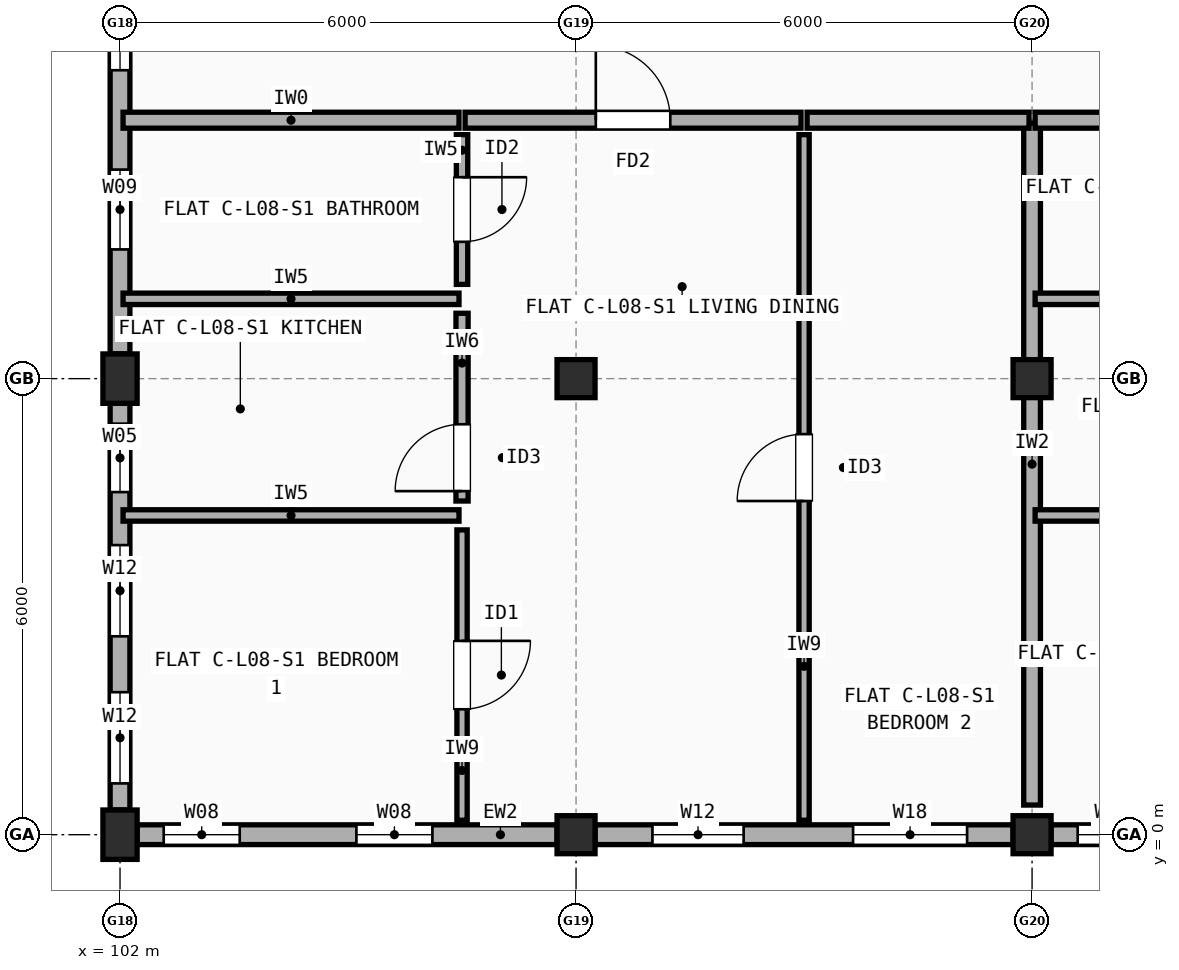
"""IFC4 building model, lengths in metres.
Left out: names, types, materials, properties, quantities, classifications, styles, units other than length and angle.
Written with IfcOpenShell. Run it as: python <this file> out.ifc"""

import sys

from ifc_helpers import new_model, si_unit, direction, frame, frame_2d, origin, origin_2d, place, context, subcontext, project, spatial, rectangle, extrude, element, fill, save


model = new_model("IFC4")
c1 = context("Model", 3, precision=1e-05, world=origin(), true_north=direction((0.0, 1.0)))
c2 = subcontext(c1, "Body", "Model", "MODEL_VIEW")
j1 = project(units=[si_unit("LENGTHUNIT", "METRE"), si_unit("PLANEANGLEUNIT", "RADIAN")], contexts=[c1])
p1 = place(None, origin())
s1 = spatial("IfcSite", under=j1, at=p1, CompositionType="ELEMENT")
p2 = place(p1, origin())
s2 = spatial("IfcBuilding", under=s1, at=p2, CompositionType="ELEMENT")
p3 = place(p2, frame((0.0, 0.0, 26.9)))
s3 = spatial("IfcBuildingStorey", under=s2, at=p3, CompositionType="ELEMENT", Elevation=26.9)
for number, where, z_axis, x_axis in (
    (1, (102.0, 0.0, 0.0), (0.0, 0.0, 1.0), (1.0, 0.0, 0.0)),
    (2, (102.0, 6.0, 0.0), (0.0, 0.0, 1.0), (1.0, 0.0, 0.0)),
):
    element("IfcColumn", number, at=place(p3, frame(where, z_axis=z_axis, x_axis=x_axis)), inside=s3, PredefinedType="COLUMN", context=c2, shape_type="SweptSolid", body=[
        extrude(rectangle(XDim=0.45, YDim=0.65, at=origin_2d()), origin(), (0.0, 0.0, 1.0), 2.98),
    ])
for number, where, z_axis, x_axis in (
    (3, (108.0, 0.0, 0.0), (0.0, 0.0, 1.0), (1.0, 0.0, 0.0)),
    (4, (108.0, 6.0, 0.0), (0.0, 0.0, 1.0), (1.0, 0.0, 0.0)),
    (5, (114.0, 0.0, 0.0), (0.0, 0.0, 1.0), (1.0, 0.0, 0.0)),
    (6, (114.0, 6.0, 0.0), (0.0, 0.0, 1.0), (1.0, 0.0, 0.0)),
):
    element("IfcColumn", number, at=place(p3, frame(where, z_axis=z_axis, x_axis=x_axis)), inside=s3, PredefinedType="COLUMN", context=c2, shape_type="SweptSolid", body=[
        extrude(rectangle(XDim=0.5, YDim=0.5, at=origin_2d()), origin(), (0.0, 0.0, 1.0), 2.98),
    ])
p4 = place(p3, frame((102.225, 0.0, 0.0), z_axis=(0.0, 0.0, 1.0), x_axis=(1.0, 0.0, 0.0)))
e7 = element("IfcWall", 7, at=p4, inside=s3, PredefinedType="STANDARD", context=c2, shape_type="SweptSolid", body=[
    extrude(rectangle(XDim=5.525, YDim=0.26, at=frame_2d((2.762, 0.0))), origin(), (0.0, 0.0, 1.0), 2.462),
])
p5 = place(p4, frame((0.35, 0.0, 0.9)))
e8 = element("IfcOpeningElement", 8, at=p5, cuts=e7, PredefinedType="OPENING", context=c2, shape_type="SweptSolid", body=[
    extrude(rectangle(XDim=1.0, YDim=1.4, at=frame_2d((0.5, 0.7))), frame((0.0, 0.14, 0.0), z_axis=(0.0, -1.0, 0.0), x_axis=(1.0, 0.0, 0.0)), (0.0, 0.0, 1.0), 0.28),
])
p6 = place(p4, frame((2.885, 0.0, 0.9)))
e9 = element("IfcOpeningElement", 9, at=p6, cuts=e7, PredefinedType="OPENING", context=c2, shape_type="SweptSolid", body=[
    extrude(rectangle(XDim=1.0, YDim=1.4, at=frame_2d((0.5, 0.7))), frame((0.0, 0.14, 0.0), z_axis=(0.0, -1.0, 0.0), x_axis=(1.0, 0.0, 0.0)), (0.0, 0.0, 1.0), 0.28),
])
p7 = place(p3, frame((108.25, 0.0, 0.0), z_axis=(0.0, 0.0, 1.0), x_axis=(1.0, 0.0, 0.0)))
e10 = element("IfcWall", 10, at=p7, inside=s3, PredefinedType="STANDARD", context=c2, shape_type="SweptSolid", body=[
    extrude(rectangle(XDim=5.5, YDim=0.26, at=frame_2d((2.75, 0.0))), origin(), (0.0, 0.0, 1.0), 2.462),
])
p8 = place(p7, frame((0.755, 0.0, 0.9)))
e11 = element("IfcOpeningElement", 11, at=p8, cuts=e10, PredefinedType="OPENING", context=c2, shape_type="SweptSolid", body=[
    extrude(rectangle(XDim=1.2, YDim=1.35, at=frame_2d((0.6, 0.675))), frame((0.0, 0.14, 0.0), z_axis=(0.0, -1.0, 0.0), x_axis=(1.0, 0.0, 0.0)), (0.0, 0.0, 1.0), 0.28),
])
p9 = place(p7, frame((3.395, 0.0, 0.9)))
e12 = element("IfcOpeningElement", 12, at=p9, cuts=e10, PredefinedType="OPENING", context=c2, shape_type="SweptSolid", body=[
    extrude(rectangle(XDim=1.5, YDim=1.4, at=frame_2d((0.75, 0.7))), frame((0.0, 0.14, 0.0), z_axis=(0.0, -1.0, 0.0), x_axis=(1.0, 0.0, 0.0)), (0.0, 0.0, 1.0), 0.28),
])
p10 = place(p3, frame((114.25, 0.0, 0.0), z_axis=(0.0, 0.0, 1.0), x_axis=(1.0, 0.0, 0.0)))
e13 = element("IfcWall", 13, at=p10, inside=s3, PredefinedType="STANDARD", context=c2, shape_type="SweptSolid", body=[
    extrude(rectangle(XDim=5.5, YDim=0.26, at=frame_2d((2.75, 0.0))), origin(), (0.0, 0.0, 1.0), 2.462),
])
p11 = place(p10, frame((0.35, 0.0, 0.9)))
e14 = element("IfcOpeningElement", 14, at=p11, cuts=e13, PredefinedType="OPENING", context=c2, shape_type="SweptSolid", body=[
    extrude(rectangle(XDim=0.9, YDim=1.4, at=frame_2d((0.45, 0.7))), frame((0.0, 0.14, 0.0), z_axis=(0.0, -1.0, 0.0), x_axis=(1.0, 0.0, 0.0)), (0.0, 0.0, 1.0), 0.28),
])
p12 = place(p10, frame((2.96, 0.0, 0.9)))
e15 = element("IfcOpeningElement", 15, at=p12, cuts=e13, PredefinedType="OPENING", context=c2, shape_type="SweptSolid", body=[
    extrude(rectangle(XDim=0.9, YDim=1.4, at=frame_2d((0.45, 0.7))), frame((0.0, 0.14, 0.0), z_axis=(0.0, -1.0, 0.0), x_axis=(1.0, 0.0, 0.0)), (0.0, 0.0, 1.0), 0.28),
])
p13 = place(p3, frame((102.0, 11.675, 0.0), z_axis=(0.0, 0.0, 1.0), x_axis=(0.0, -1.0, 0.0)))
e16 = element("IfcWall", 16, at=p13, inside=s3, PredefinedType="STANDARD", context=c2, shape_type="SweptSolid", body=[
    extrude(rectangle(XDim=5.35, YDim=0.26, at=frame_2d((2.675, 0.0))), origin(), (0.0, 0.0, 1.0), 2.462),
])
p14 = place(p13, frame((0.617, 0.0, 0.9)))
e17 = element("IfcOpeningElement", 17, at=p14, cuts=e16, PredefinedType="OPENING", context=c2, shape_type="SweptSolid", body=[
    extrude(rectangle(XDim=1.0, YDim=1.4, at=frame_2d((0.5, 0.7))), frame((0.0, 0.14, 0.0), z_axis=(0.0, -1.0, 0.0), x_axis=(1.0, 0.0, 0.0)), (0.0, 0.0, 1.0), 0.28),
])
p15 = place(p13, frame((2.925, 0.0, 0.9)))
e18 = element("IfcOpeningElement", 18, at=p15, cuts=e16, PredefinedType="OPENING", context=c2, shape_type="SweptSolid", body=[
    extrude(rectangle(XDim=1.05, YDim=1.35, at=frame_2d((0.525, 0.675))), frame((0.0, 0.14, 0.0), z_axis=(0.0, -1.0, 0.0), x_axis=(1.0, 0.0, 0.0)), (0.0, 0.0, 1.0), 0.28),
])
p16 = place(p3, frame((102.0, 5.675, 0.0), z_axis=(0.0, 0.0, 1.0), x_axis=(0.0, -1.0, 0.0)))
e19 = element("IfcWall", 19, at=p16, inside=s3, PredefinedType="STANDARD", context=c2, shape_type="SweptSolid", body=[
    extrude(rectangle(XDim=5.35, YDim=0.26, at=frame_2d((2.675, 0.0))), origin(), (0.0, 0.0, 1.0), 2.462),
])
p17 = place(p16, frame((0.268, 0.0, 0.9)))
e20 = element("IfcOpeningElement", 20, at=p17, cuts=e19, PredefinedType="OPENING", context=c2, shape_type="SweptSolid", body=[
    extrude(rectangle(XDim=0.9, YDim=1.4, at=frame_2d((0.45, 0.7))), frame((0.0, 0.14, 0.0), z_axis=(0.0, -1.0, 0.0), x_axis=(1.0, 0.0, 0.0)), (0.0, 0.0, 1.0), 0.28),
])
p18 = place(p16, frame((1.865, 0.0, 0.9)))
e21 = element("IfcOpeningElement", 21, at=p18, cuts=e19, PredefinedType="OPENING", context=c2, shape_type="SweptSolid", body=[
    extrude(rectangle(XDim=1.2, YDim=1.35, at=frame_2d((0.6, 0.675))), frame((0.0, 0.14, 0.0), z_axis=(0.0, -1.0, 0.0), x_axis=(1.0, 0.0, 0.0)), (0.0, 0.0, 1.0), 0.28),
])
p19 = place(p16, frame((3.8, 0.0, 0.9)))
e22 = element("IfcOpeningElement", 22, at=p19, cuts=e19, PredefinedType="OPENING", context=c2, shape_type="SweptSolid", body=[
    extrude(rectangle(XDim=1.2, YDim=1.35, at=frame_2d((0.6, 0.675))), frame((0.0, 0.14, 0.0), z_axis=(0.0, -1.0, 0.0), x_axis=(1.0, 0.0, 0.0)), (0.0, 0.0, 1.0), 0.28),
])
p20 = place(p3, frame((114.0, 0.39, 0.0), z_axis=(0.0, 0.0, 1.0), x_axis=(0.0, 1.0, 0.0)))
e23 = element("IfcWall", 23, at=p20, inside=s3, PredefinedType="SOLIDWALL", context=c2, shape_type="SweptSolid", body=[
    extrude(rectangle(XDim=8.97, YDim=0.22, at=frame_2d((4.485, 0.0))), origin(), (0.0, 0.0, 1.0), 2.458),
])
p21 = place(p3, frame((102.04, 9.4, 0.0), z_axis=(0.0, 0.0, 1.0), x_axis=(1.0, 0.0, 0.0)))
e24 = element("IfcWall", 24, at=p21, inside=s3, PredefinedType="SOLIDWALL", context=c2, shape_type="SweptSolid", body=[
    extrude(rectangle(XDim=4.42, YDim=0.21, at=frame_2d((2.21, 0.0))), origin(), (0.0, 0.0, 1.0), 2.462),
])
p22 = place(p3, frame((106.54, 9.4, 0.0), z_axis=(0.0, 0.0, 1.0), x_axis=(1.0, 0.0, 0.0)))
e25 = element("IfcWall", 25, at=p22, inside=s3, PredefinedType="SOLIDWALL", context=c2, shape_type="SweptSolid", body=[
    extrude(rectangle(XDim=4.42, YDim=0.21, at=frame_2d((2.21, 0.0))), origin(), (0.0, 0.0, 1.0), 2.548),
])
p23 = place(p22, frame((1.72, 0.0, 0.0)))
e26 = element("IfcOpeningElement", 26, at=p23, cuts=e25, PredefinedType="OPENING", context=c2, shape_type="SweptSolid", body=[
    extrude(rectangle(XDim=0.98, YDim=2.15, at=frame_2d((0.49, 1.075))), frame((0.0, 0.115, 0.0), z_axis=(0.0, -1.0, 0.0), x_axis=(1.0, 0.0, 0.0)), (0.0, 0.0, 1.0), 0.23),
])
p24 = place(p3, frame((106.5, 0.19, 0.0), z_axis=(0.0, 0.0, 1.0), x_axis=(0.0, 1.0, 0.0)))
e27 = element("IfcWall", 27, at=p24, inside=s3, PredefinedType="PARTITIONING", context=c2, shape_type="SweptSolid", body=[
    extrude(rectangle(XDim=3.82, YDim=0.135, at=frame_2d((1.91, 0.0))), origin(), (0.0, 0.0, 1.0), 2.98),
])
p25 = place(p24, frame((1.46, 0.0, 0.0)))
e28 = element("IfcOpeningElement", 28, at=p25, cuts=e27, PredefinedType="OPENING", context=c2, shape_type="SweptSolid", body=[
    extrude(rectangle(XDim=0.9, YDim=2.1, at=frame_2d((0.45, 1.05))), frame((0.0, 0.077, 0.0), z_axis=(0.0, -1.0, 0.0), x_axis=(1.0, 0.0, 0.0)), (0.0, 0.0, 1.0), 0.155),
])
p26 = place(p3, frame((106.5, 4.39, 0.0), z_axis=(0.0, 0.0, 1.0), x_axis=(0.0, 1.0, 0.0)))
e29 = element("IfcWall", 29, at=p26, inside=s3, PredefinedType="PLUMBINGWALL", context=c2, shape_type="SweptSolid", body=[
    extrude(rectangle(XDim=2.47, YDim=0.16, at=frame_2d((1.235, 0.0))), origin(), (0.0, 0.0, 1.0), 2.462),
])
p27 = place(p26, frame((0.13, 0.0, 0.0)))
e30 = element("IfcOpeningElement", 30, at=p27, cuts=e29, PredefinedType="OPENING", context=c2, shape_type="SweptSolid", body=[
    extrude(rectangle(XDim=0.88, YDim=2.1, at=frame_2d((0.44, 1.05))), frame((0.0, 0.09, 0.0), z_axis=(0.0, -1.0, 0.0), x_axis=(1.0, 0.0, 0.0)), (0.0, 0.0, 1.0), 0.18),
])
p28 = place(p3, frame((106.5, 7.24, 0.0), z_axis=(0.0, 0.0, 1.0), x_axis=(0.0, 1.0, 0.0)))
e31 = element("IfcWall", 31, at=p28, inside=s3, PredefinedType="PARTITIONING", context=c2, shape_type="SweptSolid", body=[
    extrude(rectangle(XDim=1.97, YDim=0.15, at=frame_2d((0.985, 0.0))), origin(), (0.0, 0.0, 1.0), 2.98),
])
p29 = place(p28, frame((0.56, 0.0, 0.0)))
e32 = element("IfcOpeningElement", 32, at=p29, cuts=e31, PredefinedType="OPENING", context=c2, shape_type="SweptSolid", body=[
    extrude(rectangle(XDim=0.85, YDim=2.1, at=frame_2d((0.425, 1.05))), frame((0.0, 0.085, 0.0), z_axis=(0.0, -1.0, 0.0), x_axis=(1.0, 0.0, 0.0)), (0.0, 0.0, 1.0), 0.17),
])
for number, where, z_axis, x_axis in (
    (33, (102.04, 4.2, 0.0), (0.0, 0.0, 1.0), (1.0, 0.0, 0.0)),
    (34, (102.04, 7.05, 0.0), (0.0, 0.0, 1.0), (1.0, 0.0, 0.0)),
):
    element("IfcWall", number, at=place(p3, frame(where, z_axis=z_axis, x_axis=x_axis)), inside=s3, PredefinedType="PARTITIONING", context=c2, shape_type="SweptSolid", body=[
        extrude(rectangle(XDim=4.42, YDim=0.15, at=frame_2d((2.21, 0.0))), origin(), (0.0, 0.0, 1.0), 2.462),
    ])
p30 = place(p3, frame((111.04, 9.4, 0.0), z_axis=(0.0, 0.0, 1.0), x_axis=(1.0, 0.0, 0.0)))
e35 = element("IfcWall", 35, at=p30, inside=s3, PredefinedType="SOLIDWALL", context=c2, shape_type="SweptSolid", body=[
    extrude(rectangle(XDim=2.92, YDim=0.21, at=frame_2d((1.46, 0.0))), origin(), (0.0, 0.0, 1.0), 2.548),
])
p31 = place(p3, frame((111.0, 0.19, 0.0), z_axis=(0.0, 0.0, 1.0), x_axis=(0.0, 1.0, 0.0)))
e36 = element("IfcWall", 36, at=p31, inside=s3, PredefinedType="PARTITIONING", context=c2, shape_type="SweptSolid", body=[
    extrude(rectangle(XDim=9.02, YDim=0.135, at=frame_2d((4.51, 0.0))), origin(), (0.0, 0.0, 1.0), 2.462),
])
p32 = place(p31, frame((4.2, 0.0, 0.0)))
e37 = element("IfcOpeningElement", 37, at=p32, cuts=e36, PredefinedType="OPENING", context=c2, shape_type="SweptSolid", body=[
    extrude(rectangle(XDim=0.88, YDim=2.1, at=frame_2d((0.44, 1.05))), frame((0.0, 0.077, 0.0), z_axis=(0.0, -1.0, 0.0), x_axis=(1.0, 0.0, 0.0)), (0.0, 0.0, 1.0), 0.155),
])
p33 = place(p3, frame((114.04, 9.4, 0.0), z_axis=(0.0, 0.0, 1.0), x_axis=(1.0, 0.0, 0.0)))
e38 = element("IfcWall", 38, at=p33, inside=s3, PredefinedType="SOLIDWALL", context=c2, shape_type="SweptSolid", body=[
    extrude(rectangle(XDim=4.42, YDim=0.21, at=frame_2d((2.21, 0.0))), origin(), (0.0, 0.0, 1.0), 2.548),
])
p34 = place(p3, frame((114.04, 4.2, 0.0), z_axis=(0.0, 0.0, 1.0), x_axis=(1.0, 0.0, 0.0)))
e39 = element("IfcWall", 39, at=p34, inside=s3, PredefinedType="PARTITIONING", context=c2, shape_type="SweptSolid", body=[
    extrude(rectangle(XDim=4.42, YDim=0.15, at=frame_2d((2.21, 0.0))), origin(), (0.0, 0.0, 1.0), 2.458),
])
p35 = place(p3, frame((114.04, 7.05, 0.0), z_axis=(0.0, 0.0, 1.0), x_axis=(1.0, 0.0, 0.0)))
e40 = element("IfcWall", 40, at=p35, inside=s3, PredefinedType="PARTITIONING", context=c2, shape_type="SweptSolid", body=[
    extrude(rectangle(XDim=4.42, YDim=0.15, at=frame_2d((2.21, 0.0))), origin(), (0.0, 0.0, 1.0), 2.548),
])
p36 = place(p5, origin())
e41 = element("IfcWindow", 41, at=p36, inside=s3, PartitioningType="SINGLE_PANEL", PredefinedType="WINDOW", context=c2, shape_type="SweptSolid", body=[
    extrude(rectangle(XDim=1.0, YDim=1.4, at=frame_2d((0.5, 0.7))), frame((0.0, 0.03, 0.0), z_axis=(0.0, -1.0, 0.0), x_axis=(1.0, 0.0, 0.0)), (0.0, 0.0, 1.0), 0.06),
])
fill(e8, e41)
p37 = place(p6, origin())
e42 = element("IfcWindow", 42, at=p37, inside=s3, PartitioningType="SINGLE_PANEL", PredefinedType="WINDOW", context=c2, shape_type="SweptSolid", body=[
    extrude(rectangle(XDim=1.0, YDim=1.4, at=frame_2d((0.5, 0.7))), frame((0.0, 0.03, 0.0), z_axis=(0.0, -1.0, 0.0), x_axis=(1.0, 0.0, 0.0)), (0.0, 0.0, 1.0), 0.06),
])
fill(e9, e42)
p38 = place(p8, origin())
e43 = element("IfcWindow", 43, at=p38, inside=s3, PartitioningType="SINGLE_PANEL", PredefinedType="WINDOW", context=c2, shape_type="SweptSolid", body=[
    extrude(rectangle(XDim=1.2, YDim=1.35, at=frame_2d((0.6, 0.675))), frame((0.0, 0.03, 0.0), z_axis=(0.0, -1.0, 0.0), x_axis=(1.0, 0.0, 0.0)), (0.0, 0.0, 1.0), 0.06),
])
fill(e11, e43)
p39 = place(p9, origin())
e44 = element("IfcWindow", 44, at=p39, inside=s3, PartitioningType="SINGLE_PANEL", PredefinedType="WINDOW", context=c2, shape_type="SweptSolid", body=[
    extrude(rectangle(XDim=1.5, YDim=1.4, at=frame_2d((0.75, 0.7))), frame((0.0, 0.03, 0.0), z_axis=(0.0, -1.0, 0.0), x_axis=(1.0, 0.0, 0.0)), (0.0, 0.0, 1.0), 0.06),
])
fill(e12, e44)
p40 = place(p11, origin())
e45 = element("IfcWindow", 45, at=p40, inside=s3, PartitioningType="SINGLE_PANEL", PredefinedType="WINDOW", context=c2, shape_type="SweptSolid", body=[
    extrude(rectangle(XDim=0.9, YDim=1.4, at=frame_2d((0.45, 0.7))), frame((0.0, 0.03, 0.0), z_axis=(0.0, -1.0, 0.0), x_axis=(1.0, 0.0, 0.0)), (0.0, 0.0, 1.0), 0.06),
])
fill(e14, e45)
p41 = place(p14, origin())
e46 = element("IfcWindow", 46, at=p41, inside=s3, PartitioningType="SINGLE_PANEL", PredefinedType="WINDOW", context=c2, shape_type="SweptSolid", body=[
    extrude(rectangle(XDim=1.0, YDim=1.4, at=frame_2d((0.5, 0.7))), frame((0.0, 0.03, 0.0), z_axis=(0.0, -1.0, 0.0), x_axis=(1.0, 0.0, 0.0)), (0.0, 0.0, 1.0), 0.06),
])
fill(e17, e46)
p42 = place(p15, origin())
e47 = element("IfcWindow", 47, at=p42, inside=s3, PartitioningType="SINGLE_PANEL", PredefinedType="WINDOW", context=c2, shape_type="SweptSolid", body=[
    extrude(rectangle(XDim=1.05, YDim=1.35, at=frame_2d((0.525, 0.675))), frame((0.0, 0.03, 0.0), z_axis=(0.0, -1.0, 0.0), x_axis=(1.0, 0.0, 0.0)), (0.0, 0.0, 1.0), 0.06),
])
fill(e18, e47)
p43 = place(p17, origin())
e48 = element("IfcWindow", 48, at=p43, inside=s3, PartitioningType="SINGLE_PANEL", PredefinedType="WINDOW", context=c2, shape_type="SweptSolid", body=[
    extrude(rectangle(XDim=0.9, YDim=1.4, at=frame_2d((0.45, 0.7))), frame((0.0, 0.03, 0.0), z_axis=(0.0, -1.0, 0.0), x_axis=(1.0, 0.0, 0.0)), (0.0, 0.0, 1.0), 0.06),
])
fill(e20, e48)
p44 = place(p18, origin())
e49 = element("IfcWindow", 49, at=p44, inside=s3, PartitioningType="SINGLE_PANEL", PredefinedType="WINDOW", context=c2, shape_type="SweptSolid", body=[
    extrude(rectangle(XDim=1.2, YDim=1.35, at=frame_2d((0.6, 0.675))), frame((0.0, 0.03, 0.0), z_axis=(0.0, -1.0, 0.0), x_axis=(1.0, 0.0, 0.0)), (0.0, 0.0, 1.0), 0.06),
])
fill(e21, e49)
p45 = place(p19, origin())
e50 = element("IfcWindow", 50, at=p45, inside=s3, PartitioningType="SINGLE_PANEL", PredefinedType="WINDOW", context=c2, shape_type="SweptSolid", body=[
    extrude(rectangle(XDim=1.2, YDim=1.35, at=frame_2d((0.6, 0.675))), frame((0.0, 0.03, 0.0), z_axis=(0.0, -1.0, 0.0), x_axis=(1.0, 0.0, 0.0)), (0.0, 0.0, 1.0), 0.06),
])
fill(e22, e50)
p46 = place(p23, origin())
e51 = element("IfcDoor", 51, at=p46, inside=s3, OperationType="SINGLE_SWING_LEFT", PredefinedType="DOOR", context=c2, shape_type="SweptSolid", body=[
    extrude(rectangle(XDim=0.98, YDim=2.15, at=frame_2d((0.49, 1.075))), frame((0.0, 0.025, 0.0), z_axis=(0.0, -1.0, 0.0), x_axis=(1.0, 0.0, 0.0)), (0.0, 0.0, 1.0), 0.05),
])
fill(e26, e51)
p47 = place(p25, origin())
e52 = element("IfcDoor", 52, at=p47, inside=s3, OperationType="SINGLE_SWING_RIGHT", PredefinedType="DOOR", context=c2, shape_type="SweptSolid", body=[
    extrude(rectangle(XDim=0.9, YDim=2.1, at=frame_2d((0.45, 1.05))), frame((0.0, 0.025, 0.0), z_axis=(0.0, -1.0, 0.0), x_axis=(1.0, 0.0, 0.0)), (0.0, 0.0, 1.0), 0.05),
])
fill(e28, e52)
p48 = place(p27, origin())
e53 = element("IfcDoor", 53, at=p48, inside=s3, OperationType="SINGLE_SWING_LEFT", PredefinedType="DOOR", context=c2, shape_type="SweptSolid", body=[
    extrude(rectangle(XDim=0.88, YDim=2.1, at=frame_2d((0.44, 1.05))), frame((0.0, 0.025, 0.0), z_axis=(0.0, -1.0, 0.0), x_axis=(1.0, 0.0, 0.0)), (0.0, 0.0, 1.0), 0.05),
])
fill(e30, e53)
p49 = place(p29, origin())
e54 = element("IfcDoor", 54, at=p49, inside=s3, OperationType="SINGLE_SWING_RIGHT", PredefinedType="DOOR", context=c2, shape_type="SweptSolid", body=[
    extrude(rectangle(XDim=0.85, YDim=2.1, at=frame_2d((0.425, 1.05))), frame((0.0, 0.025, 0.0), z_axis=(0.0, -1.0, 0.0), x_axis=(1.0, 0.0, 0.0)), (0.0, 0.0, 1.0), 0.05),
])
fill(e32, e54)
p50 = place(p32, origin())
e55 = element("IfcDoor", 55, at=p50, inside=s3, OperationType="SINGLE_SWING_LEFT", PredefinedType="DOOR", context=c2, shape_type="SweptSolid", body=[
    extrude(rectangle(XDim=0.88, YDim=2.1, at=frame_2d((0.44, 1.05))), frame((0.0, 0.025, 0.0), z_axis=(0.0, -1.0, 0.0), x_axis=(1.0, 0.0, 0.0)), (0.0, 0.0, 1.0), 0.05),
])
fill(e37, e55)
save(model, sys.argv[1])
